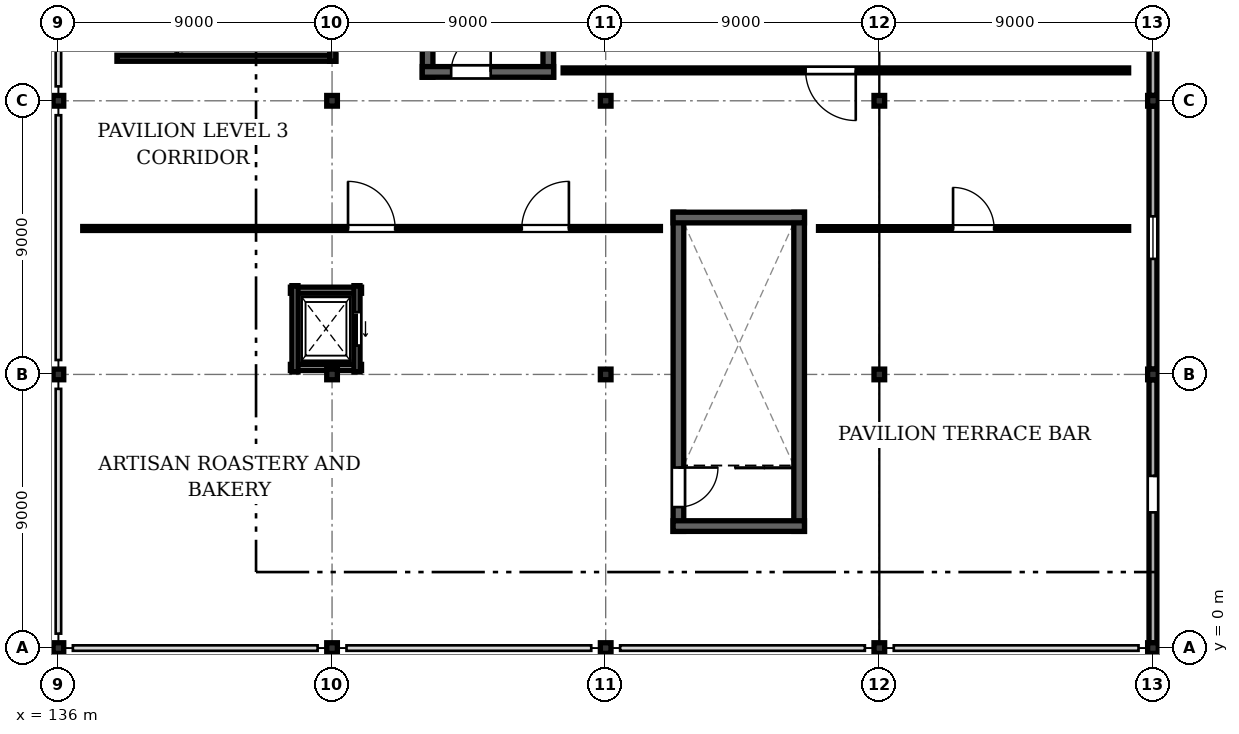
"""IFC4 building model, lengths in metres.
Left out: names, types, materials, properties, quantities, classifications, styles, units other than length and angle.
Written with IfcOpenShell. Run it as: python <this file> out.ifc"""

import sys

from ifc_helpers import new_model, si_unit, direction, frame, frame_2d, origin, origin_2d, place, context, subcontext, project, spatial, rectangle, i_section, extrude, element, fill, save


model = new_model("IFC4")
c1 = context("Model", 3, precision=1e-05, world=origin(), true_north=direction((0.0, 1.0)))
c2 = subcontext(c1, "Body", "Model", "MODEL_VIEW")
j1 = project(units=[si_unit("LENGTHUNIT", "METRE"), si_unit("PLANEANGLEUNIT", "RADIAN")], contexts=[c1])
p1 = place(None, origin())
s1 = spatial("IfcSite", under=j1, at=p1, CompositionType="ELEMENT")
p2 = place(p1, origin())
s2 = spatial("IfcBuilding", under=s1, at=p2, CompositionType="ELEMENT")
p3 = place(p2, frame((0.0, 0.0, 14.4)))
s3 = spatial("IfcBuildingStorey", under=s2, at=p3, CompositionType="ELEMENT", Elevation=14.4)
for number, where, z_axis, x_axis in (
    (1, (136.0, 0.0, 0.0), (0.0, 0.0, 1.0), (1.0, 0.0, 0.0)),
    (2, (136.0, 9.0, 0.0), (0.0, 0.0, 1.0), (1.0, 0.0, 0.0)),
    (3, (136.0, 18.0, 0.0), (0.0, 0.0, 1.0), (1.0, 0.0, 0.0)),
    (4, (145.0, 0.0, 0.0), (0.0, 0.0, 1.0), (1.0, 0.0, 0.0)),
    (5, (145.0, 9.0, 0.0), (0.0, 0.0, 1.0), (1.0, 0.0, 0.0)),
    (6, (145.0, 18.0, 0.0), (0.0, 0.0, 1.0), (1.0, 0.0, 0.0)),
    (7, (154.0, 0.0, 0.0), (0.0, 0.0, 1.0), (1.0, 0.0, 0.0)),
    (8, (154.0, 9.0, 0.0), (0.0, 0.0, 1.0), (1.0, 0.0, 0.0)),
    (9, (154.0, 18.0, 0.0), (0.0, 0.0, 1.0), (1.0, 0.0, 0.0)),
    (10, (163.0, 0.0, 0.0), (0.0, 0.0, 1.0), (1.0, 0.0, 0.0)),
    (11, (163.0, 9.0, 0.0), (0.0, 0.0, 1.0), (1.0, 0.0, 0.0)),
    (12, (163.0, 18.0, 0.0), (0.0, 0.0, 1.0), (1.0, 0.0, 0.0)),
    (13, (172.0, 0.0, 0.0), (0.0, 0.0, 1.0), (1.0, 0.0, 0.0)),
    (14, (172.0, 9.0, 0.0), (0.0, 0.0, 1.0), (1.0, 0.0, 0.0)),
    (15, (172.0, 18.0, 0.0), (0.0, 0.0, 1.0), (1.0, 0.0, 0.0)),
):
    element("IfcColumn", number, at=place(p3, frame(where, z_axis=z_axis, x_axis=x_axis)), inside=s3, PredefinedType="COLUMN", context=c2, shape_type="SweptSolid", body=[
        extrude(i_section(OverallWidth=0.35, OverallDepth=0.35, WebThickness=0.012, FlangeThickness=0.019, FilletRadius=0.02, at=origin_2d()), origin(), (0.0, 0.0, 1.0), 3.2),
    ])
p4 = place(p3, frame((172.0, 29.825, 0.0), z_axis=(0.0, 0.0, 1.0), x_axis=(0.0, -1.0, 0.0)))
e16 = element("IfcWall", 16, at=p4, inside=s3, PredefinedType="SOLIDWALL", context=c2, shape_type="SweptSolid", body=[
    extrude(rectangle(XDim=11.65, YDim=0.26, at=frame_2d((5.825, 0.0))), origin(), (0.0, 0.0, 1.0), 2.42),
])
p5 = place(p4, frame((5.125, 0.0, 0.75)))
e17 = element("IfcOpeningElement", 17, at=p5, cuts=e16, PredefinedType="OPENING", context=c2, shape_type="SweptSolid", body=[
    extrude(rectangle(XDim=1.4, YDim=1.55, at=frame_2d((0.7, 0.775))), frame((0.0, 0.14, 0.0), z_axis=(0.0, -1.0, 0.0), x_axis=(1.0, 0.0, 0.0)), (0.0, 0.0, 1.0), 0.28),
])
p6 = place(p3, frame((172.0, 17.825, 0.0), z_axis=(0.0, 0.0, 1.0), x_axis=(0.0, -1.0, 0.0)))
e18 = element("IfcWall", 18, at=p6, inside=s3, PredefinedType="SOLIDWALL", context=c2, shape_type="SweptSolid", body=[
    extrude(rectangle(XDim=8.65, YDim=0.26, at=frame_2d((4.325, 0.0))), origin(), (0.0, 0.0, 1.0), 2.42),
])
p7 = place(p6, frame((3.625, 0.0, 0.75)))
e19 = element("IfcOpeningElement", 19, at=p7, cuts=e18, PredefinedType="OPENING", context=c2, shape_type="SweptSolid", body=[
    extrude(rectangle(XDim=1.4, YDim=1.55, at=frame_2d((0.7, 0.775))), frame((0.0, 0.14, 0.0), z_axis=(0.0, -1.0, 0.0), x_axis=(1.0, 0.0, 0.0)), (0.0, 0.0, 1.0), 0.28),
])
p8 = place(p3, frame((172.0, 8.825, 0.0), z_axis=(0.0, 0.0, 1.0), x_axis=(0.0, -1.0, 0.0)))
e20 = element("IfcWall", 20, at=p8, inside=s3, PredefinedType="SOLIDWALL", context=c2, shape_type="SweptSolid", body=[
    extrude(rectangle(XDim=8.65, YDim=0.26, at=frame_2d((4.325, 0.0))), origin(), (0.0, 0.0, 1.0), 2.51),
])
p9 = place(p8, frame((3.162, 0.0, 0.0)))
e21 = element("IfcOpeningElement", 21, at=p9, cuts=e20, PredefinedType="OPENING", context=c2, shape_type="SweptSolid", body=[
    extrude(rectangle(XDim=1.2, YDim=2.1, at=frame_2d((0.6, 1.05))), frame((0.0, 0.14, 0.0), z_axis=(0.0, -1.0, 0.0), x_axis=(1.0, 0.0, 0.0)), (0.0, 0.0, 1.0), 0.28),
])
for number, where, z_axis, x_axis in (
    (22, (152.113, 18.775, 0.0), (0.0, 0.0, 1.0), (0.0, 1.0, 0.0)),
    (23, (148.143, 29.272, 0.0), (0.0, 0.0, 1.0), (0.0, -1.0, 0.0)),
):
    element("IfcWall", number, at=place(p3, frame(where, z_axis=z_axis, x_axis=x_axis)), inside=s3, PredefinedType="SHEAR", context=c2, shape_type="SweptSolid", body=[
        extrude(rectangle(XDim=10.498, YDim=0.35, at=frame_2d((5.249, 0.0))), origin(), (0.0, 0.0, 1.0), 2.995),
    ])
p10 = place(p3, frame((147.968, 18.95, 0.0), z_axis=(0.0, 0.0, 1.0), x_axis=(1.0, 0.0, 0.0)))
e24 = element("IfcWall", 24, at=p10, inside=s3, PredefinedType="SHEAR", context=c2, shape_type="SweptSolid", body=[
    extrude(rectangle(XDim=4.32, YDim=0.35, at=frame_2d((2.16, 0.0))), origin(), (0.0, 0.0, 1.0), 2.995),
])
p11 = place(p10, frame((0.95, 0.0, 0.0)))
e25 = element("IfcOpeningElement", 25, at=p11, cuts=e24, PredefinedType="OPENING", context=c2, shape_type="SweptSolid", body=[
    extrude(rectangle(XDim=1.3, YDim=2.1, at=frame_2d((0.65, 1.05))), frame((0.0, 0.185, 0.0), z_axis=(0.0, -1.0, 0.0), x_axis=(1.0, 0.0, 0.0)), (0.0, 0.0, 1.0), 0.37),
])
p12 = place(p3, frame((160.363, 3.837, 0.0), z_axis=(0.0, 0.0, 1.0), x_axis=(0.0, 1.0, 0.0)))
e26 = element("IfcWall", 26, at=p12, inside=s3, PredefinedType="SHEAR", context=c2, shape_type="SweptSolid", body=[
    extrude(rectangle(XDim=10.498, YDim=0.35, at=frame_2d((5.249, 0.0))), origin(), (0.0, 0.0, 1.0), 2.995),
])
p13 = place(p3, frame((156.393, 14.335, 0.0), z_axis=(0.0, 0.0, 1.0), x_axis=(0.0, -1.0, 0.0)))
e27 = element("IfcWall", 27, at=p13, inside=s3, PredefinedType="SHEAR", context=c2, shape_type="SweptSolid", body=[
    extrude(rectangle(XDim=10.498, YDim=0.35, at=frame_2d((5.249, 0.0))), origin(), (0.0, 0.0, 1.0), 2.995),
])
p14 = place(p13, frame((8.397, 0.0, 0.0)))
e28 = element("IfcOpeningElement", 28, at=p14, cuts=e27, PredefinedType="OPENING", context=c2, shape_type="SweptSolid", body=[
    extrude(rectangle(XDim=1.3, YDim=2.1, at=frame_2d((0.65, 1.05))), frame((0.0, 0.185, 0.0), z_axis=(0.0, -1.0, 0.0), x_axis=(1.0, 0.0, 0.0)), (0.0, 0.0, 1.0), 0.37),
])
for number, where, z_axis, x_axis in (
    (29, (160.538, 14.16, 0.0), (0.0, 0.0, 1.0), (-1.0, 0.0, 0.0)),
    (30, (156.218, 4.012, 0.0), (0.0, 0.0, 1.0), (1.0, 0.0, 0.0)),
):
    element("IfcWall", number, at=place(p3, frame(where, z_axis=z_axis, x_axis=x_axis)), inside=s3, PredefinedType="SHEAR", context=c2, shape_type="SweptSolid", body=[
        extrude(rectangle(XDim=4.32, YDim=0.35, at=frame_2d((2.16, 0.0))), origin(), (0.0, 0.0, 1.0), 2.995),
    ])
p15 = place(p3, frame((137.925, 19.4, 0.0), z_axis=(0.0, 0.0, 1.0), x_axis=(1.0, 0.0, 0.0)))
e31 = element("IfcWall", 31, at=p15, inside=s3, PredefinedType="SOLIDWALL", context=c2, shape_type="SweptSolid", body=[
    extrude(rectangle(XDim=7.198, YDim=0.2, at=frame_2d((3.599, 0.0))), origin(), (0.0, 0.0, 1.0), 1.25),
])
p16 = place(p3, frame((145.022, 19.3, 0.0), z_axis=(0.0, 0.0, 1.0), x_axis=(0.0, 1.0, 0.0)))
e32 = element("IfcWall", 32, at=p16, inside=s3, PredefinedType="SOLIDWALL", context=c2, shape_type="SweptSolid", body=[
    extrude(rectangle(XDim=4.02, YDim=0.2, at=frame_2d((2.01, 0.0))), origin(), (0.0, 0.0, 1.0), 1.25),
])
p17 = place(p3, frame((143.63, 9.23, 0.0), z_axis=(0.0, 0.0, 1.0), x_axis=(1.0, 0.0, 0.0)))
e33 = element("IfcWall", 33, at=p17, inside=s3, PredefinedType="SOLIDWALL", context=c2, shape_type="SweptSolid", body=[
    extrude(rectangle(XDim=2.34, YDim=0.2, at=frame_2d((1.17, 0.0))), origin(), (0.0, 0.0, 1.0), 2.53),
])
p18 = place(p3, frame((145.97, 11.77, 0.0), z_axis=(0.0, 0.0, 1.0), x_axis=(-1.0, 0.0, 0.0)))
e34 = element("IfcWall", 34, at=p18, inside=s3, PredefinedType="SOLIDWALL", context=c2, shape_type="SweptSolid", body=[
    extrude(rectangle(XDim=2.34, YDim=0.2, at=frame_2d((1.17, 0.0))), origin(), (0.0, 0.0, 1.0), 2.58),
])
p19 = place(p3, frame((143.78, 11.92, 0.0), z_axis=(0.0, 0.0, 1.0), x_axis=(0.0, -1.0, 0.0)))
e35 = element("IfcWall", 35, at=p19, inside=s3, PredefinedType="SOLIDWALL", context=c2, shape_type="SweptSolid", body=[
    extrude(rectangle(XDim=2.84, YDim=0.2, at=frame_2d((1.42, 0.0))), origin(), (0.0, 0.0, 1.0), 2.53),
])
p20 = place(p3, frame((145.82, 9.08, 0.0), z_axis=(0.0, 0.0, 1.0), x_axis=(0.0, 1.0, 0.0)))
e36 = element("IfcWall", 36, at=p20, inside=s3, PredefinedType="SOLIDWALL", context=c2, shape_type="SweptSolid", body=[
    extrude(rectangle(XDim=2.84, YDim=0.2, at=frame_2d((1.42, 0.0))), origin(), (0.0, 0.0, 1.0), 2.53),
])
p21 = place(p20, frame((0.87, 0.0, 0.0)))
e37 = element("IfcOpeningElement", 37, at=p21, cuts=e36, PredefinedType="OPENING", context=c2, shape_type="SweptSolid", body=[
    extrude(rectangle(XDim=1.1, YDim=2.15, at=frame_2d((0.55, 1.075))), frame((0.0, 0.11, 0.0), z_axis=(0.0, -1.0, 0.0), x_axis=(1.0, 0.0, 0.0)), (0.0, 0.0, 1.0), 0.22),
])
p22 = place(p3, frame((171.2, 19.0, 0.0), z_axis=(0.0, 0.0, 1.0), x_axis=(-1.0, 0.0, 0.0)))
e38 = element("IfcWall", 38, at=p22, inside=s3, PredefinedType="PARTITIONING", context=c2, shape_type="SweptSolid", body=[
    extrude(rectangle(XDim=18.6, YDim=0.16, at=frame_2d((9.3, 0.0))), origin(), (0.0, 0.0, 1.0), 2.42),
])
p23 = place(p22, frame((8.975, 0.0, 0.0)))
e39 = element("IfcOpeningElement", 39, at=p23, cuts=e38, PredefinedType="OPENING", context=c2, shape_type="SweptSolid", body=[
    extrude(rectangle(XDim=1.65, YDim=2.1, at=frame_2d((0.825, 1.05))), frame((0.0, 0.09, 0.0), z_axis=(0.0, -1.0, 0.0), x_axis=(1.0, 0.0, 0.0)), (0.0, 0.0, 1.0), 0.18),
])
p24 = place(p3, frame((136.8, 13.8, 0.0), z_axis=(0.0, 0.0, 1.0), x_axis=(1.0, 0.0, 0.0)))
e40 = element("IfcWall", 40, at=p24, inside=s3, PredefinedType="PARTITIONING", context=c2, shape_type="SweptSolid", body=[
    extrude(rectangle(XDim=19.0, YDim=0.13, at=frame_2d((9.5, 0.0))), origin(), (0.0, 0.0, 1.0), 2.58),
])
p25 = place(p24, frame((8.725, 0.0, 0.0)))
e41 = element("IfcOpeningElement", 41, at=p25, cuts=e40, PredefinedType="OPENING", context=c2, shape_type="SweptSolid", body=[
    extrude(rectangle(XDim=1.55, YDim=2.1, at=frame_2d((0.775, 1.05))), frame((0.0, 0.075, 0.0), z_axis=(0.0, -1.0, 0.0), x_axis=(1.0, 0.0, 0.0)), (0.0, 0.0, 1.0), 0.15),
])
p26 = place(p24, frame((14.44, 0.0, 0.0)))
e42 = element("IfcOpeningElement", 42, at=p26, cuts=e40, PredefinedType="OPENING", context=c2, shape_type="SweptSolid", body=[
    extrude(rectangle(XDim=1.55, YDim=2.1, at=frame_2d((0.775, 1.05))), frame((0.0, 0.075, 0.0), z_axis=(0.0, -1.0, 0.0), x_axis=(1.0, 0.0, 0.0)), (0.0, 0.0, 1.0), 0.15),
])
p27 = place(p3, frame((161.0, 13.8, 0.0), z_axis=(0.0, 0.0, 1.0), x_axis=(1.0, 0.0, 0.0)))
e43 = element("IfcWall", 43, at=p27, inside=s3, PredefinedType="PARTITIONING", context=c2, shape_type="SweptSolid", body=[
    extrude(rectangle(XDim=10.2, YDim=0.12, at=frame_2d((5.1, 0.0))), origin(), (0.0, 0.0, 1.0), 2.58),
])
p28 = place(p27, frame((4.425, 0.0, 0.0)))
e44 = element("IfcOpeningElement", 44, at=p28, cuts=e43, PredefinedType="OPENING", context=c2, shape_type="SweptSolid", body=[
    extrude(rectangle(XDim=1.35, YDim=2.1, at=frame_2d((0.675, 1.05))), frame((0.0, 0.07, 0.0), z_axis=(0.0, -1.0, 0.0), x_axis=(1.0, 0.0, 0.0)), (0.0, 0.0, 1.0), 0.14),
])
p29 = place(p7, origin())
e45 = element("IfcWindow", 45, at=p29, inside=s3, PartitioningType="SINGLE_PANEL", PredefinedType="WINDOW", context=c2, shape_type="SweptSolid", body=[
    extrude(rectangle(XDim=1.4, YDim=1.55, at=frame_2d((0.7, 0.775))), frame((0.0, 0.03, 0.0), z_axis=(0.0, -1.0, 0.0), x_axis=(1.0, 0.0, 0.0)), (0.0, 0.0, 1.0), 0.06),
])
fill(e19, e45)
p30 = place(p9, origin())
e46 = element("IfcDoor", 46, at=p30, inside=s3, OperationType="SINGLE_SWING_LEFT", PredefinedType="DOOR", context=c2, shape_type="SweptSolid", body=[
    extrude(rectangle(XDim=1.2, YDim=2.1, at=frame_2d((0.6, 1.05))), frame((0.0, 0.025, 0.0), z_axis=(0.0, -1.0, 0.0), x_axis=(1.0, 0.0, 0.0)), (0.0, 0.0, 1.0), 0.05),
])
fill(e21, e46)
p31 = place(p11, origin())
e47 = element("IfcDoor", 47, at=p31, inside=s3, OperationType="SINGLE_SWING_RIGHT", PredefinedType="DOOR", context=c2, shape_type="SweptSolid", body=[
    extrude(rectangle(XDim=1.3, YDim=2.1, at=frame_2d((0.65, 1.05))), frame((0.0, 0.025, 0.0), z_axis=(0.0, -1.0, 0.0), x_axis=(1.0, 0.0, 0.0)), (0.0, 0.0, 1.0), 0.05),
])
fill(e25, e47)
p32 = place(p14, origin())
e48 = element("IfcDoor", 48, at=p32, inside=s3, OperationType="SINGLE_SWING_LEFT", PredefinedType="DOOR", context=c2, shape_type="SweptSolid", body=[
    extrude(rectangle(XDim=1.3, YDim=2.1, at=frame_2d((0.65, 1.05))), frame((0.0, 0.025, 0.0), z_axis=(0.0, -1.0, 0.0), x_axis=(1.0, 0.0, 0.0)), (0.0, 0.0, 1.0), 0.05),
])
fill(e28, e48)
p33 = place(p21, origin())
e49 = element("IfcDoor", 49, at=p33, inside=s3, OperationType="SLIDING_TO_LEFT", PredefinedType="DOOR", context=c2, shape_type="SweptSolid", body=[
    extrude(rectangle(XDim=1.1, YDim=2.15, at=frame_2d((0.55, 1.075))), frame((0.0, 0.025, 0.0), z_axis=(0.0, -1.0, 0.0), x_axis=(1.0, 0.0, 0.0)), (0.0, 0.0, 1.0), 0.05),
])
fill(e37, e49)
p34 = place(p23, origin())
e50 = element("IfcDoor", 50, at=p34, inside=s3, OperationType="SINGLE_SWING_LEFT", PredefinedType="DOOR", context=c2, shape_type="SweptSolid", body=[
    extrude(rectangle(XDim=1.65, YDim=2.1, at=frame_2d((0.825, 1.05))), frame((0.0, 0.025, 0.0), z_axis=(0.0, -1.0, 0.0), x_axis=(1.0, 0.0, 0.0)), (0.0, 0.0, 1.0), 0.05),
])
fill(e39, e50)
p35 = place(p25, origin())
e51 = element("IfcDoor", 51, at=p35, inside=s3, OperationType="SINGLE_SWING_LEFT", PredefinedType="DOOR", context=c2, shape_type="SweptSolid", body=[
    extrude(rectangle(XDim=1.55, YDim=2.1, at=frame_2d((0.775, 1.05))), frame((0.0, 0.025, 0.0), z_axis=(0.0, -1.0, 0.0), x_axis=(1.0, 0.0, 0.0)), (0.0, 0.0, 1.0), 0.05),
])
fill(e41, e51)
p36 = place(p26, origin())
e52 = element("IfcDoor", 52, at=p36, inside=s3, OperationType="SINGLE_SWING_RIGHT", PredefinedType="DOOR", context=c2, shape_type="SweptSolid", body=[
    extrude(rectangle(XDim=1.55, YDim=2.1, at=frame_2d((0.775, 1.05))), frame((0.0, 0.025, 0.0), z_axis=(0.0, -1.0, 0.0), x_axis=(1.0, 0.0, 0.0)), (0.0, 0.0, 1.0), 0.05),
])
fill(e42, e52)
p37 = place(p28, origin())
e53 = element("IfcDoor", 53, at=p37, inside=s3, OperationType="SINGLE_SWING_LEFT", PredefinedType="DOOR", context=c2, shape_type="SweptSolid", body=[
    extrude(rectangle(XDim=1.35, YDim=2.1, at=frame_2d((0.675, 1.05))), frame((0.0, 0.025, 0.0), z_axis=(0.0, -1.0, 0.0), x_axis=(1.0, 0.0, 0.0)), (0.0, 0.0, 1.0), 0.05),
])
fill(e44, e53)
save(model, sys.argv[1])
